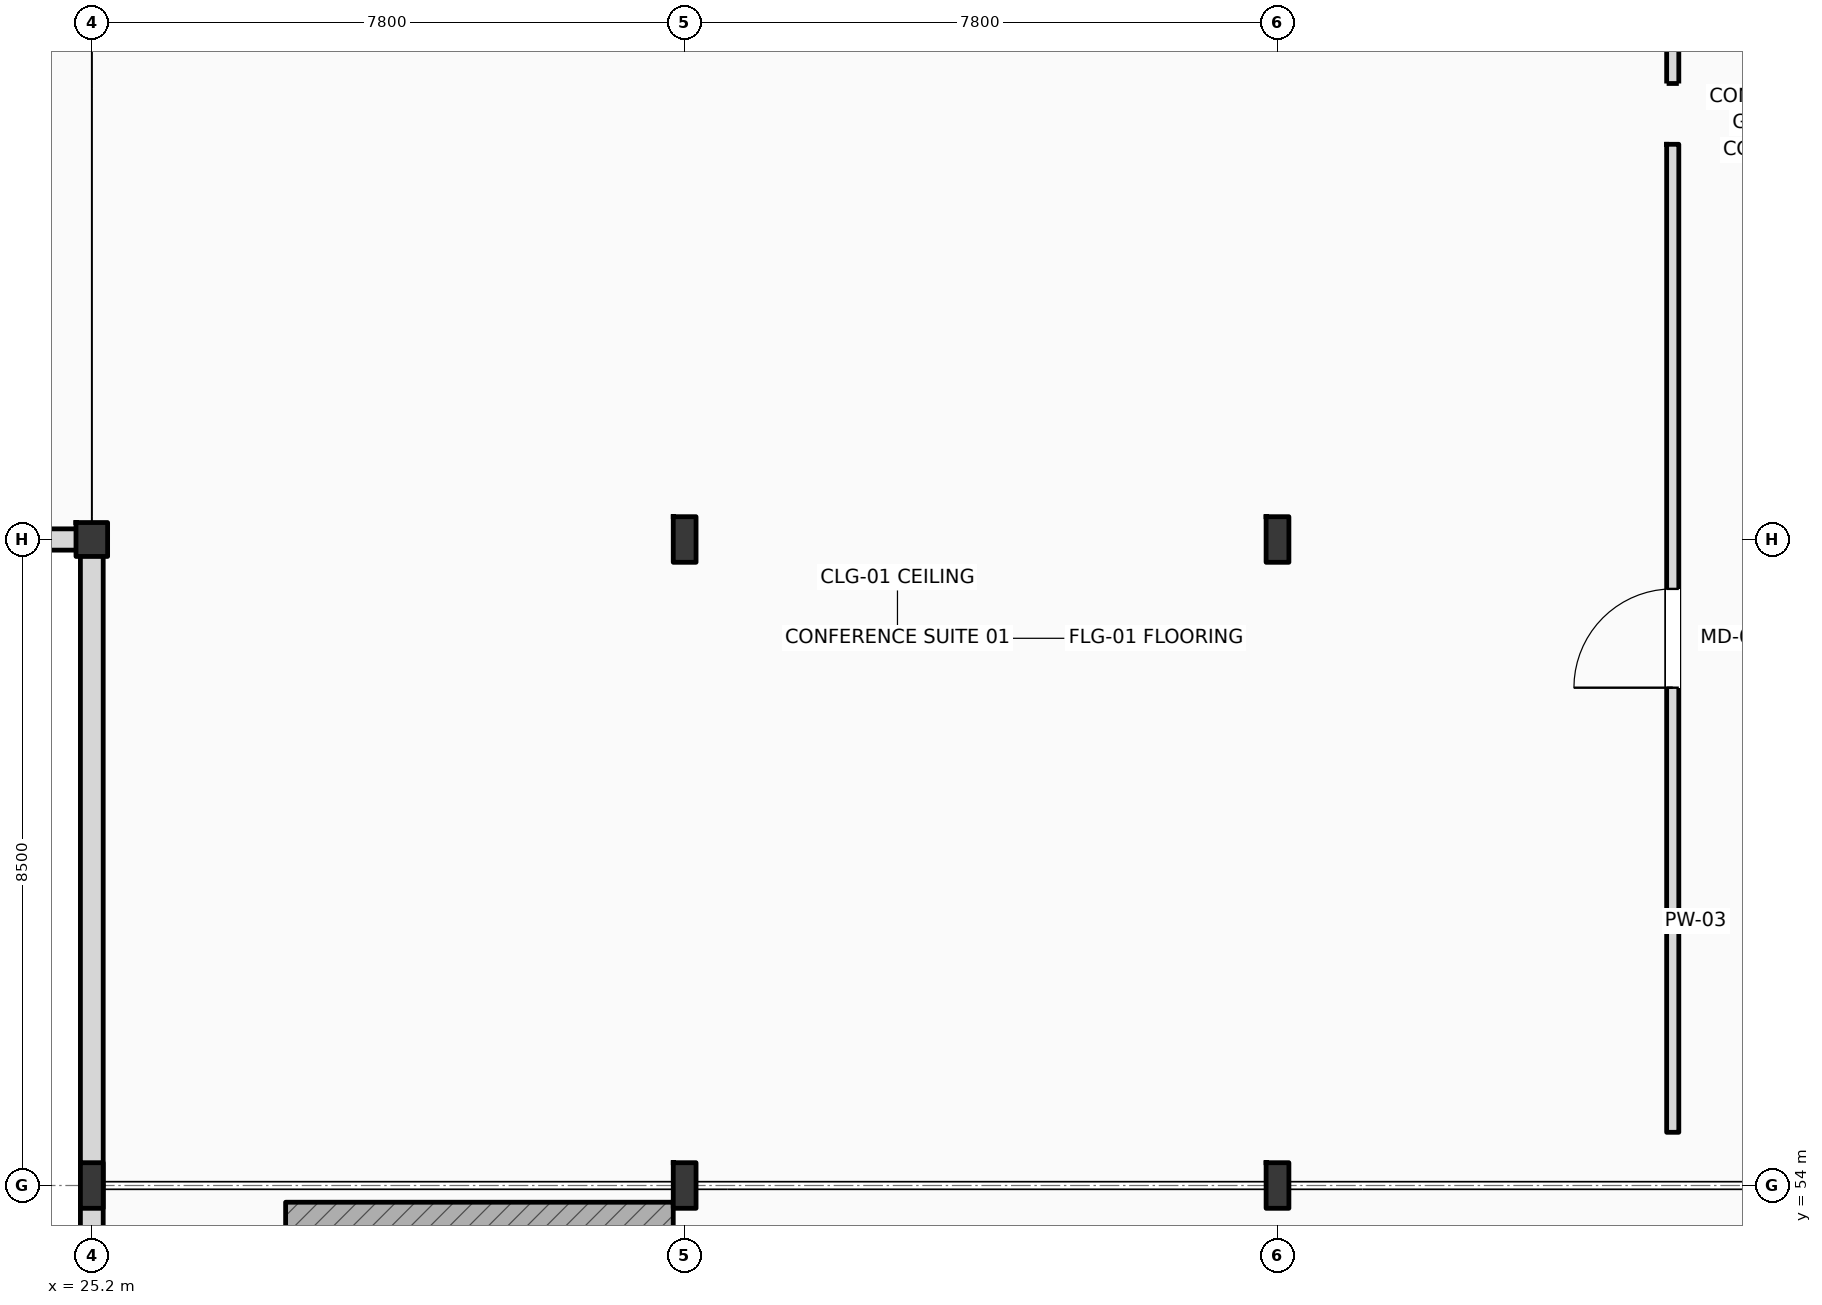
"""IFC4 building model, lengths in metres.
Left out: names, types, materials, properties, quantities, classifications, styles, units other than length and angle.
Written with IfcOpenShell. Run it as: python <this file> out.ifc"""

import sys

from ifc_helpers import new_model, si_unit, direction, frame, frame_2d, origin, origin_2d, place, context, subcontext, project, spatial, rectangle, i_section, extrude, element, fill, save


model = new_model("IFC4")
c1 = context("Model", 3, precision=1e-05, world=origin(), true_north=direction((0.0, 1.0)))
c2 = subcontext(c1, "Body", "Model", "MODEL_VIEW")
j1 = project(units=[si_unit("LENGTHUNIT", "METRE"), si_unit("PLANEANGLEUNIT", "RADIAN")], contexts=[c1])
p1 = place(None, origin())
s1 = spatial("IfcSite", under=j1, at=p1, CompositionType="ELEMENT")
p2 = place(p1, origin())
s2 = spatial("IfcBuilding", under=s1, at=p2, CompositionType="ELEMENT")
p3 = place(p2, frame((0.0, 0.0, 6.0)))
s3 = spatial("IfcBuildingStorey", under=s2, at=p3, CompositionType="ELEMENT", Elevation=6.0)
p4 = place(p3, frame((25.2, 62.5, 0.0), z_axis=(0.0, 0.0, 1.0), x_axis=(1.0, 0.0, 0.0)))
e1 = element("IfcColumn", 1, at=p4, inside=s3, PredefinedType="COLUMN", context=c2, shape_type="SweptSolid", body=[
    extrude(i_section(OverallWidth=0.416, OverallDepth=0.446, WebThickness=0.036, FlangeThickness=0.048, FilletRadius=0.015, at=origin_2d()), origin(), (0.0, 0.0, 1.0), 5.4),
])
for number, where, z_axis, x_axis in (
    (2, (25.2, 54.0, 0.0), (0.0, 0.0, 1.0), (1.0, 0.0, 0.0)),
    (3, (33.0, 54.0, 0.0), (0.0, 0.0, 1.0), (1.0, 0.0, 0.0)),
    (4, (33.0, 62.5, 0.0), (0.0, 0.0, 1.0), (1.0, 0.0, 0.0)),
    (5, (40.8, 54.0, 0.0), (0.0, 0.0, 1.0), (1.0, 0.0, 0.0)),
    (6, (40.8, 62.5, 0.0), (0.0, 0.0, 1.0), (1.0, 0.0, 0.0)),
):
    element("IfcColumn", number, at=place(p3, frame(where, z_axis=z_axis, x_axis=x_axis)), inside=s3, PredefinedType="COLUMN", context=c2, shape_type="SweptSolid", body=[
        extrude(i_section(OverallWidth=0.3, OverallDepth=0.6, WebThickness=0.015, FlangeThickness=0.03, FilletRadius=0.027, at=origin_2d()), origin(), (0.0, 0.0, 1.0), 5.4),
    ])
p5 = place(p3, frame((27.75, 53.605, 0.0), z_axis=(0.0, 0.0, 1.0), x_axis=(1.0, 0.0, 0.0)))
e7 = element("IfcWall", 7, at=p5, inside=s3, PredefinedType="SHEAR", context=c2, shape_type="SweptSolid", body=[
    extrude(rectangle(XDim=5.1, YDim=0.35, at=frame_2d((2.55, 0.0))), origin(), (0.0, 0.0, 1.0), 5.4),
])
p6 = place(p3, frame((25.2, 45.0, 0.0), z_axis=(0.0, 0.0, 1.0), x_axis=(0.0, 1.0, 0.0)))
e8 = element("IfcWall", 8, at=p6, inside=s3, PredefinedType="STANDARD", context=c2, shape_type="SweptSolid", body=[
    extrude(rectangle(XDim=9.0, YDim=0.3, at=frame_2d((4.5, 0.0))), origin(), (0.0, 0.0, 1.0), 4.59),
])
p7 = place(p6, frame((3.45, 0.0, 1.05)))
e9 = element("IfcOpeningElement", 9, at=p7, cuts=e8, PredefinedType="OPENING", context=c2, shape_type="SweptSolid", body=[
    extrude(rectangle(XDim=2.1, YDim=2.2, at=frame_2d((1.05, 1.1))), frame((0.0, 0.16, 0.0), z_axis=(0.0, -1.0, 0.0), x_axis=(1.0, 0.0, 0.0)), (0.0, 0.0, 1.0), 0.32),
])
p8 = place(p3, frame((25.2, 54.0, 0.0), z_axis=(0.0, 0.0, 1.0), x_axis=(0.0, 1.0, 0.0)))
e10 = element("IfcWall", 10, at=p8, inside=s3, PredefinedType="STANDARD", context=c2, shape_type="SweptSolid", body=[
    extrude(rectangle(XDim=8.5, YDim=0.3, at=frame_2d((4.25, 0.0))), origin(), (0.0, 0.0, 1.0), 4.55),
])
p9 = place(p3, frame((0.0, 62.5, 0.0), z_axis=(0.0, 0.0, 1.0), x_axis=(1.0, 0.0, 0.0)))
e11 = element("IfcWall", 11, at=p9, inside=s3, PredefinedType="STANDARD", context=c2, shape_type="SweptSolid", body=[
    extrude(rectangle(XDim=25.2, YDim=0.28, at=frame_2d((12.6, 0.0))), origin(), (0.0, 0.0, 1.0), 2.84),
])
p10 = place(p3, frame((46.0, 54.7, 0.0), z_axis=(0.0, 0.0, 1.0), x_axis=(0.0, 1.0, 0.0)))
e12 = element("IfcWall", 12, at=p10, inside=s3, PredefinedType="PARTITIONING", context=c2, shape_type="SweptSolid", body=[
    extrude(rectangle(XDim=13.0, YDim=0.16, at=frame_2d((6.5, 0.0))), origin(), (0.0, 0.0, 1.0), 4.71),
])
p11 = place(p10, frame((5.85, 0.0, 0.0)))
e13 = element("IfcOpeningElement", 13, at=p11, cuts=e12, PredefinedType="OPENING", context=c2, shape_type="SweptSolid", body=[
    extrude(rectangle(XDim=1.3, YDim=2.2, at=frame_2d((0.65, 1.1))), frame((0.0, 0.09, 0.0), z_axis=(0.0, -1.0, 0.0), x_axis=(1.0, 0.0, 0.0)), (0.0, 0.0, 1.0), 0.18),
])
p12 = place(p3, frame((46.0, 68.5, 0.0), z_axis=(0.0, 0.0, 1.0), x_axis=(0.0, 1.0, 0.0)))
e14 = element("IfcWall", 14, at=p12, inside=s3, PredefinedType="PARTITIONING", context=c2, shape_type="SweptSolid", body=[
    extrude(rectangle(XDim=13.2, YDim=0.16, at=frame_2d((6.6, 0.0))), origin(), (0.0, 0.0, 1.0), 4.71),
])
p13 = place(p12, frame((5.95, 0.0, 0.0)))
e15 = element("IfcOpeningElement", 15, at=p13, cuts=e14, PredefinedType="OPENING", context=c2, shape_type="SweptSolid", body=[
    extrude(rectangle(XDim=1.3, YDim=2.2, at=frame_2d((0.65, 1.1))), frame((0.0, 0.09, 0.0), z_axis=(0.0, -1.0, 0.0), x_axis=(1.0, 0.0, 0.0)), (0.0, 0.0, 1.0), 0.18),
])
p14 = place(p11, origin())
e16 = element("IfcDoor", 16, at=p14, inside=s3, OperationType="SINGLE_SWING_LEFT", PredefinedType="DOOR", context=c2, shape_type="SweptSolid", body=[
    extrude(rectangle(XDim=1.3, YDim=2.2, at=frame_2d((0.65, 1.1))), frame((0.0, 0.025, 0.0), z_axis=(0.0, -1.0, 0.0), x_axis=(1.0, 0.0, 0.0)), (0.0, 0.0, 1.0), 0.05),
])
fill(e13, e16)
save(model, sys.argv[1])
